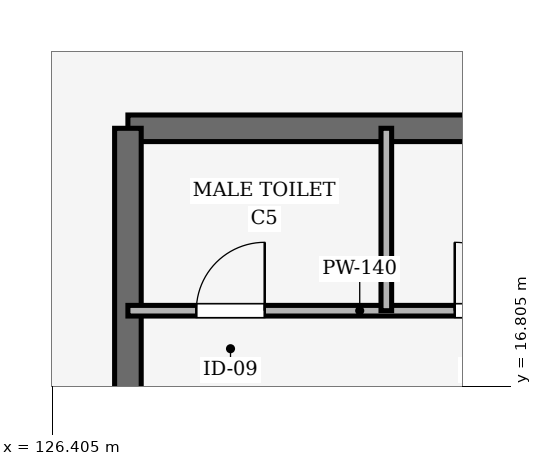
"""IFC4 building model, lengths in metres.
Left out: names, types, materials, properties, quantities, classifications, styles, units other than length and angle.
Written with IfcOpenShell. Run it as: python <this file> out.ifc"""

import sys

from ifc_helpers import new_model, si_unit, direction, frame, frame_2d, origin, place, context, subcontext, project, spatial, rectangle, extrude, element, fill, save


model = new_model("IFC4")
c1 = context("Model", 3, precision=1e-05, world=origin(), true_north=direction((0.0, 1.0)))
c2 = subcontext(c1, "Body", "Model", "MODEL_VIEW")
j1 = project(units=[si_unit("LENGTHUNIT", "METRE"), si_unit("PLANEANGLEUNIT", "RADIAN")], contexts=[c1])
p1 = place(None, origin())
s1 = spatial("IfcSite", under=j1, at=p1, CompositionType="ELEMENT")
p2 = place(p1, origin())
s2 = spatial("IfcBuilding", under=s1, at=p2, CompositionType="ELEMENT")
p3 = place(p2, frame((0.0, 0.0, 16.2)))
s3 = spatial("IfcBuildingStorey", under=s2, at=p3, CompositionType="ELEMENT", Elevation=16.2)
p4 = place(p3, frame((137.6, 20.2, 0.0), z_axis=(0.0, 0.0, 1.0), x_axis=(-1.0, 0.0, 0.0)))
e1 = element("IfcWall", 1, at=p4, inside=s3, PredefinedType="SHEAR", context=c2, shape_type="SweptSolid", body=[
    extrude(rectangle(XDim=10.2, YDim=0.35, at=frame_2d((5.1, 0.0))), origin(), (0.0, 0.0, 1.0), 4.5),
])
p5 = place(p3, frame((127.4, 20.2, 0.0), z_axis=(0.0, 0.0, 1.0), x_axis=(0.0, -1.0, 0.0)))
e2 = element("IfcWall", 2, at=p5, inside=s3, PredefinedType="SHEAR", context=c2, shape_type="SweptSolid", body=[
    extrude(rectangle(XDim=8.4, YDim=0.35, at=frame_2d((4.2, 0.0))), origin(), (0.0, 0.0, 1.0), 4.5),
])
p6 = place(p3, frame((127.4, 17.8, 0.0), z_axis=(0.0, 0.0, 1.0), x_axis=(1.0, 0.0, 0.0)))
e3 = element("IfcWall", 3, at=p6, inside=s3, PredefinedType="PARTITIONING", context=c2, shape_type="SweptSolid", body=[
    extrude(rectangle(XDim=10.2, YDim=0.14, at=frame_2d((5.1, 0.0))), origin(), (0.0, 0.0, 1.0), 3.6),
])
p7 = place(p6, frame((0.9, 0.0, 0.0)))
e4 = element("IfcOpeningElement", 4, at=p7, cuts=e3, PredefinedType="OPENING", context=c2, shape_type="SweptSolid", body=[
    extrude(rectangle(XDim=0.9, YDim=2.1, at=frame_2d((0.45, 1.05))), frame((0.0, 0.08, 0.0), z_axis=(0.0, -1.0, 0.0), x_axis=(1.0, 0.0, 0.0)), (0.0, 0.0, 1.0), 0.16),
])
p8 = place(p6, frame((4.3, 0.0, 0.0)))
e5 = element("IfcOpeningElement", 5, at=p8, cuts=e3, PredefinedType="OPENING", context=c2, shape_type="SweptSolid", body=[
    extrude(rectangle(XDim=0.9, YDim=2.1, at=frame_2d((0.45, 1.05))), frame((0.0, 0.08, 0.0), z_axis=(0.0, -1.0, 0.0), x_axis=(1.0, 0.0, 0.0)), (0.0, 0.0, 1.0), 0.16),
])
p9 = place(p6, frame((7.7, 0.0, 0.0)))
e6 = element("IfcOpeningElement", 6, at=p9, cuts=e3, PredefinedType="OPENING", context=c2, shape_type="SweptSolid", body=[
    extrude(rectangle(XDim=0.95, YDim=2.1, at=frame_2d((0.475, 1.05))), frame((0.0, 0.08, 0.0), z_axis=(0.0, -1.0, 0.0), x_axis=(1.0, 0.0, 0.0)), (0.0, 0.0, 1.0), 0.16),
])
p10 = place(p3, frame((130.8, 17.8, 0.0), z_axis=(0.0, 0.0, 1.0), x_axis=(0.0, 1.0, 0.0)))
e7 = element("IfcWall", 7, at=p10, inside=s3, PredefinedType="PARTITIONING", context=c2, shape_type="SweptSolid", body=[
    extrude(rectangle(XDim=2.4, YDim=0.14, at=frame_2d((1.2, 0.0))), origin(), (0.0, 0.0, 1.0), 3.6),
])
p11 = place(p7, origin())
e8 = element("IfcDoor", 8, at=p11, inside=s3, OperationType="SINGLE_SWING_RIGHT", PredefinedType="DOOR", context=c2, shape_type="SweptSolid", body=[
    extrude(rectangle(XDim=0.9, YDim=2.1, at=frame_2d((0.45, 1.05))), frame((0.0, 0.025, 0.0), z_axis=(0.0, -1.0, 0.0), x_axis=(1.0, 0.0, 0.0)), (0.0, 0.0, 1.0), 0.05),
])
fill(e4, e8)
p12 = place(p8, origin())
e9 = element("IfcDoor", 9, at=p12, inside=s3, OperationType="SINGLE_SWING_LEFT", PredefinedType="DOOR", context=c2, shape_type="SweptSolid", body=[
    extrude(rectangle(XDim=0.9, YDim=2.1, at=frame_2d((0.45, 1.05))), frame((0.0, 0.025, 0.0), z_axis=(0.0, -1.0, 0.0), x_axis=(1.0, 0.0, 0.0)), (0.0, 0.0, 1.0), 0.05),
])
fill(e5, e9)
save(model, sys.argv[1])
